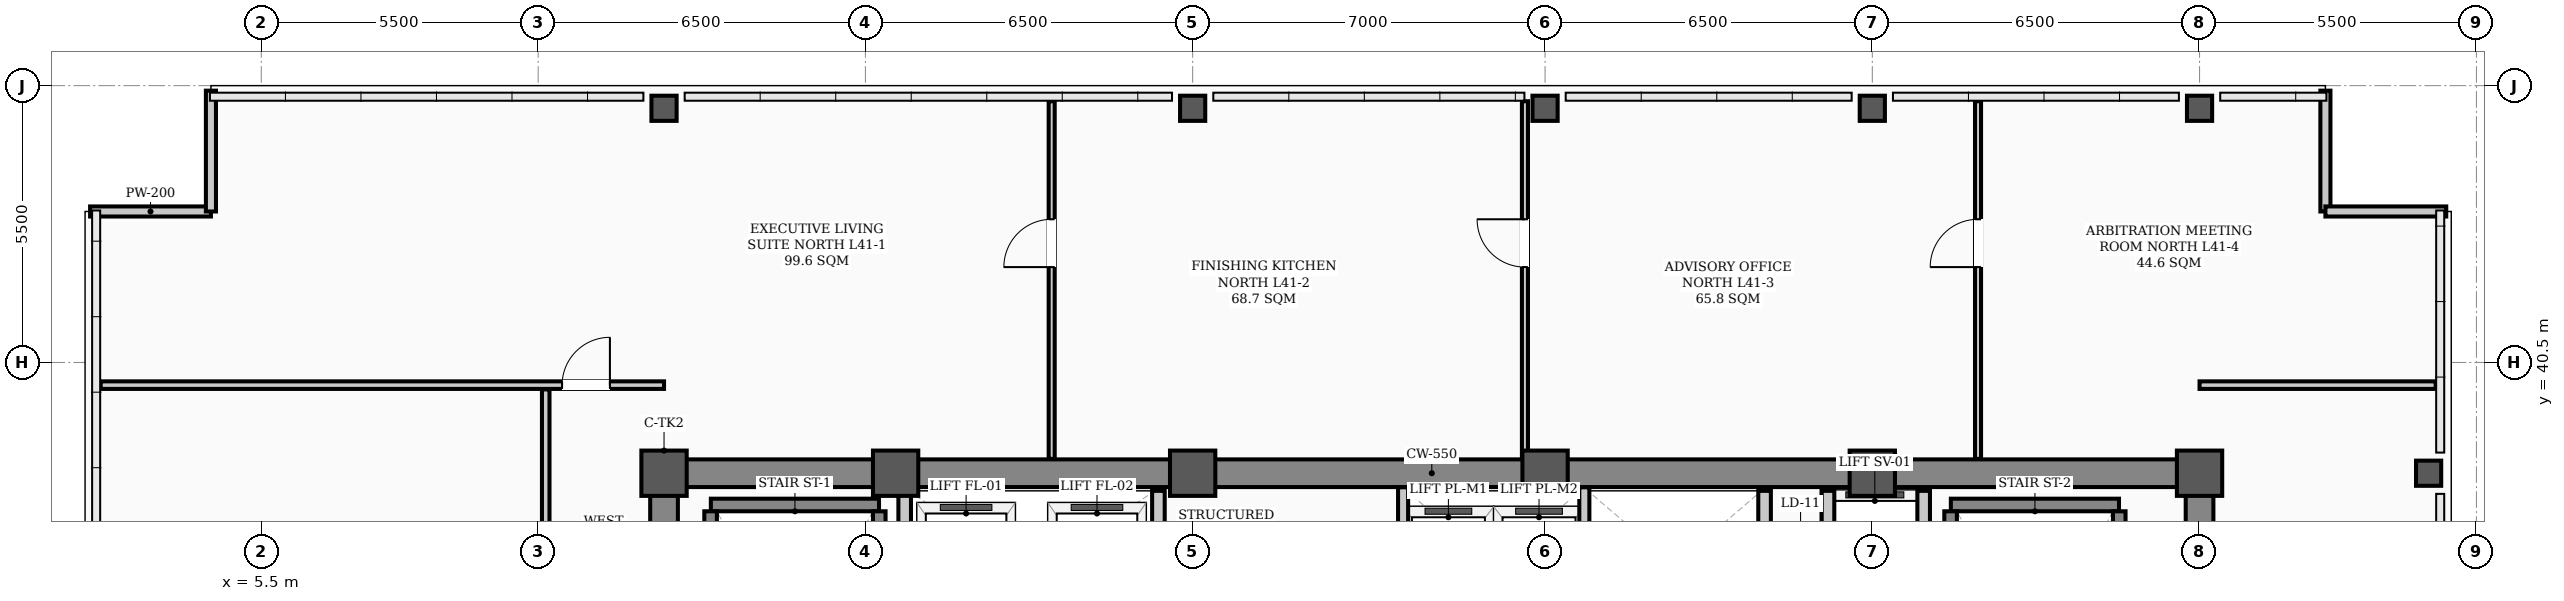
"""IFC4 building model, lengths in metres.
Left out: names, types, materials, properties, quantities, classifications, styles, units other than length and angle.
Written with IfcOpenShell. Run it as: python <this file> out.ifc"""

import sys

from ifc_helpers import new_model, si_unit, direction, frame, frame_2d, origin, origin_2d, place, context, subcontext, project, spatial, rectangle, hollow_rectangle, extrude, element, fill, save


model = new_model("IFC4")
c1 = context("Model", 3, precision=1e-05, world=origin(), true_north=direction((0.0, 1.0)))
c2 = subcontext(c1, "Body", "Model", "MODEL_VIEW")
j1 = project(units=[si_unit("LENGTHUNIT", "METRE"), si_unit("PLANEANGLEUNIT", "RADIAN")], contexts=[c1])
p1 = place(None, origin())
s1 = spatial("IfcSite", under=j1, at=p1, CompositionType="ELEMENT")
p2 = place(p1, origin())
s2 = spatial("IfcBuilding", under=s1, at=p2, CompositionType="ELEMENT")
p3 = place(p2, frame((0.0, 0.0, 165.6)))
s3 = spatial("IfcBuildingStorey", under=s2, at=p3, CompositionType="ELEMENT", Elevation=165.6)
for number, where, z_axis, x_axis in (
    (1, (13.5, 38.3, 0.0), (0.0, 0.0, 1.0), (1.0, 0.0, 0.0)),
    (2, (18.1, 38.3, 0.0), (0.0, 0.0, 1.0), (1.0, 0.0, 0.0)),
    (3, (24.0, 38.3, 0.0), (0.0, 0.0, 1.0), (1.0, 0.0, 0.0)),
    (4, (31.0, 38.3, 0.0), (0.0, 0.0, 1.0), (1.0, 0.0, 0.0)),
    (5, (37.5, 38.3, 0.0), (0.0, 0.0, 1.0), (1.0, 0.0, 0.0)),
    (6, (44.0, 38.3, 0.0), (0.0, 0.0, 1.0), (1.0, 0.0, 0.0)),
):
    element("IfcColumn", number, at=place(p3, frame(where, z_axis=z_axis, x_axis=x_axis)), inside=s3, PredefinedType="COLUMN", context=c2, shape_type="SweptSolid", body=[
        extrude(hollow_rectangle(XDim=0.9, YDim=0.9, WallThickness=0.035, InnerFilletRadius=0.017, OuterFilletRadius=0.052, at=origin_2d()), origin(), (0.0, 0.0, 1.0), 3.9),
    ])
for number, where, z_axis, x_axis in (
    (7, (13.5, 45.55, 0.0), (0.0, 0.0, 1.0), (1.0, 0.0, 0.0)),
    (8, (24.0, 45.55, 0.0), (0.0, 0.0, 1.0), (1.0, 0.0, 0.0)),
    (9, (31.0, 45.55, 0.0), (0.0, 0.0, 1.0), (1.0, 0.0, 0.0)),
    (10, (37.5, 45.55, 0.0), (0.0, 0.0, 1.0), (1.0, 0.0, 0.0)),
    (11, (44.0, 45.55, 0.0), (0.0, 0.0, 1.0), (1.0, 0.0, 0.0)),
):
    element("IfcColumn", number, at=place(p3, frame(where, z_axis=z_axis, x_axis=x_axis)), inside=s3, PredefinedType="COLUMN", context=c2, shape_type="SweptSolid", body=[
        extrude(hollow_rectangle(XDim=0.5, YDim=0.5, WallThickness=0.024, InnerFilletRadius=0.012, OuterFilletRadius=0.036, at=origin_2d()), origin(), (0.0, 0.0, 1.0), 3.66),
    ])
p4 = place(p3, frame((48.55, 38.3, 0.0), z_axis=(0.0, 0.0, 1.0), x_axis=(1.0, 0.0, 0.0)))
e12 = element("IfcColumn", 12, at=p4, inside=s3, PredefinedType="COLUMN", context=c2, shape_type="SweptSolid", body=[
    extrude(hollow_rectangle(XDim=0.5, YDim=0.5, WallThickness=0.024, InnerFilletRadius=0.012, OuterFilletRadius=0.036, at=origin_2d()), origin(), (0.0, 0.0, 1.0), 3.9),
])
for number, where, z_axis, x_axis in (
    (13, (2.1, 43.5, 0.0), (0.0, 0.0, 1.0), (1.0, 0.0, 0.0)),
    (14, (4.5, 43.5, 0.0), (0.0, 0.0, 1.0), (0.0, 1.0, 0.0)),
    (15, (46.5, 45.9, 0.0), (0.0, 0.0, 1.0), (0.0, -1.0, 0.0)),
    (16, (46.5, 43.5, 0.0), (0.0, 0.0, 1.0), (1.0, 0.0, 0.0)),
):
    element("IfcWall", number, at=place(p3, frame(where, z_axis=z_axis, x_axis=x_axis)), inside=s3, PredefinedType="PARAPET", context=c2, shape_type="SweptSolid", body=[
        extrude(rectangle(XDim=2.4, YDim=0.2, at=frame_2d((1.2, 0.0))), origin(), (0.0, 0.0, 1.0), 1.2),
    ])
p5 = place(p3, frame((13.5, 38.3, 0.0), z_axis=(0.0, 0.0, 1.0), x_axis=(1.0, 0.0, 0.0)))
e17 = element("IfcWall", 17, at=p5, inside=s3, PredefinedType="SHEAR", context=c2, shape_type="SweptSolid", body=[
    extrude(rectangle(XDim=30.5, YDim=0.55, at=frame_2d((15.25, 0.0))), origin(), (0.0, 0.0, 1.0), 3.66),
])
for number, where, z_axis, x_axis in (
    (18, (13.5, 29.35, 0.0), (0.0, 0.0, 1.0), (0.0, 1.0, 0.0)),
    (19, (44.0, 29.35, 0.0), (0.0, 0.0, 1.0), (0.0, 1.0, 0.0)),
):
    element("IfcWall", number, at=place(p3, frame(where, z_axis=z_axis, x_axis=x_axis)), inside=s3, PredefinedType="SHEAR", context=c2, shape_type="SweptSolid", body=[
        extrude(rectangle(XDim=8.6, YDim=0.55, at=frame_2d((4.3, 0.0))), origin(), (0.0, 0.0, 1.0), 3.66),
    ])
p6 = place(p3, frame((14.43, 37.669, 0.0), z_axis=(0.0, 0.0, 1.0), x_axis=(1.0, 0.0, 0.0)))
e20 = element("IfcWall", 20, at=p6, inside=s3, PredefinedType="STANDARD", context=c2, shape_type="SweptSolid", body=[
    extrude(rectangle(XDim=3.34, YDim=0.25, at=frame_2d((1.67, 0.0))), origin(), (0.0, 0.0, 1.0), 3.66),
])
for number, where, z_axis, x_axis in (
    (21, (14.425, 30.36, 0.0), (0.0, 0.0, 1.0), (0.0, 1.0, 0.0)),
    (22, (17.775, 30.36, 0.0), (0.0, 0.0, 1.0), (0.0, 1.0, 0.0)),
):
    element("IfcWall", number, at=place(p3, frame(where, z_axis=z_axis, x_axis=x_axis)), inside=s3, PredefinedType="STANDARD", context=c2, shape_type="SweptSolid", body=[
        extrude(rectangle(XDim=7.184, YDim=0.25, at=frame_2d((3.592, 0.0))), origin(), (0.0, 0.0, 1.0), 3.66),
    ])
p7 = place(p3, frame((39.06, 37.669, 0.0), z_axis=(0.0, 0.0, 1.0), x_axis=(1.0, 0.0, 0.0)))
e23 = element("IfcWall", 23, at=p7, inside=s3, PredefinedType="STANDARD", context=c2, shape_type="SweptSolid", body=[
    extrude(rectangle(XDim=3.34, YDim=0.25, at=frame_2d((1.67, 0.0))), origin(), (0.0, 0.0, 1.0), 3.66),
])
for number, where, z_axis, x_axis in (
    (24, (39.055, 30.36, 0.0), (0.0, 0.0, 1.0), (0.0, 1.0, 0.0)),
    (25, (42.405, 30.36, 0.0), (0.0, 0.0, 1.0), (0.0, 1.0, 0.0)),
):
    element("IfcWall", number, at=place(p3, frame(where, z_axis=z_axis, x_axis=x_axis)), inside=s3, PredefinedType="STANDARD", context=c2, shape_type="SweptSolid", body=[
        extrude(rectangle(XDim=7.184, YDim=0.25, at=frame_2d((3.592, 0.0))), origin(), (0.0, 0.0, 1.0), 3.66),
    ])
p8 = place(p3, frame((36.62, 31.95, 0.0), z_axis=(0.0, 0.0, 1.0), x_axis=(0.0, 1.0, 0.0)))
e26 = element("IfcWall", 26, at=p8, inside=s3, PredefinedType="STANDARD", context=c2, shape_type="SweptSolid", body=[
    extrude(rectangle(XDim=6.0, YDim=0.25, at=frame_2d((3.0, 0.0))), origin(), (0.0, 0.0, 1.0), 2.24),
])
p9 = place(p8, frame((0.9, 0.0, 0.0)))
e27 = element("IfcOpeningElement", 27, at=p9, cuts=e26, PredefinedType="OPENING", context=c2, shape_type="SweptSolid", body=[
    extrude(rectangle(XDim=1.1, YDim=2.08, at=frame_2d((0.55, 1.04))), frame((0.0, 0.135, 0.0), z_axis=(0.0, -1.0, 0.0), x_axis=(1.0, 0.0, 0.0)), (0.0, 0.0, 1.0), 0.27),
])
p10 = place(p8, frame((4.0, 0.0, 0.0)))
e28 = element("IfcOpeningElement", 28, at=p10, cuts=e26, PredefinedType="OPENING", context=c2, shape_type="SweptSolid", body=[
    extrude(rectangle(XDim=1.1, YDim=2.08, at=frame_2d((0.55, 1.04))), frame((0.0, 0.135, 0.0), z_axis=(0.0, -1.0, 0.0), x_axis=(1.0, 0.0, 0.0)), (0.0, 0.0, 1.0), 0.27),
])
p11 = place(p3, frame((38.52, 31.95, 0.0), z_axis=(0.0, 0.0, 1.0), x_axis=(0.0, 1.0, 0.0)))
e29 = element("IfcWall", 29, at=p11, inside=s3, PredefinedType="STANDARD", context=c2, shape_type="SweptSolid", body=[
    extrude(rectangle(XDim=6.0, YDim=0.25, at=frame_2d((3.0, 0.0))), origin(), (0.0, 0.0, 1.0), 2.24),
])
for number, where, z_axis, x_axis in (
    (30, (18.28, 34.62, 0.0), (0.0, 0.0, 1.0), (0.0, 1.0, 0.0)),
    (31, (23.32, 34.62, 0.0), (0.0, 0.0, 1.0), (0.0, 1.0, 0.0)),
):
    element("IfcWall", number, at=place(p3, frame(where, z_axis=z_axis, x_axis=x_axis)), inside=s3, PredefinedType="STANDARD", context=c2, shape_type="SweptSolid", body=[
        extrude(rectangle(XDim=3.33, YDim=0.25, at=frame_2d((1.665, 0.0))), origin(), (0.0, 0.0, 1.0), 2.24),
    ])
p12 = place(p3, frame((35.36, 34.9, 0.0), z_axis=(0.0, 0.0, 1.0), x_axis=(0.0, 1.0, 0.0)))
e32 = element("IfcWall", 32, at=p12, inside=s3, PredefinedType="STANDARD", context=c2, shape_type="SweptSolid", body=[
    extrude(rectangle(XDim=3.05, YDim=0.25, at=frame_2d((1.525, 0.0))), origin(), (0.0, 0.0, 1.0), 2.24),
])
p13 = place(p3, frame((2.31, 40.05, 0.0), z_axis=(0.0, 0.0, 1.0), x_axis=(1.0, 0.0, 0.0)))
e33 = element("IfcWall", 33, at=p13, inside=s3, PredefinedType="PARTITIONING", context=c2, shape_type="SweptSolid", body=[
    extrude(rectangle(XDim=11.19, YDim=0.15, at=frame_2d((5.595, 0.0))), origin(), (0.0, 0.0, 1.0), 2.24),
])
p14 = place(p13, frame((9.165, 0.0, 0.0)))
e34 = element("IfcOpeningElement", 34, at=p14, cuts=e33, PredefinedType="OPENING", context=c2, shape_type="SweptSolid", body=[
    extrude(rectangle(XDim=0.95, YDim=2.08, at=frame_2d((0.475, 1.04))), frame((0.0, 0.085, 0.0), z_axis=(0.0, -1.0, 0.0), x_axis=(1.0, 0.0, 0.0)), (0.0, 0.0, 1.0), 0.17),
])
p15 = place(p3, frame((44.0, 40.05, 0.0), z_axis=(0.0, 0.0, 1.0), x_axis=(1.0, 0.0, 0.0)))
e35 = element("IfcWall", 35, at=p15, inside=s3, PredefinedType="PARTITIONING", context=c2, shape_type="SweptSolid", body=[
    extrude(rectangle(XDim=4.69, YDim=0.15, at=frame_2d((2.345, 0.0))), origin(), (0.0, 0.0, 1.0), 2.24),
])
p16 = place(p3, frame((11.15, 26.385, 0.0), z_axis=(0.0, 0.0, 1.0), x_axis=(0.0, 1.0, 0.0)))
e36 = element("IfcWall", 36, at=p16, inside=s3, PredefinedType="PARTITIONING", context=c2, shape_type="SweptSolid", body=[
    extrude(rectangle(XDim=13.58, YDim=0.15, at=frame_2d((6.79, 0.0))), origin(), (0.0, 0.0, 1.0), 2.24),
])
p17 = place(p16, frame((6.315, 0.0, 0.0)))
e37 = element("IfcOpeningElement", 37, at=p17, cuts=e36, PredefinedType="OPENING", context=c2, shape_type="SweptSolid", body=[
    extrude(rectangle(XDim=0.95, YDim=2.08, at=frame_2d((0.475, 1.04))), frame((0.0, 0.085, 0.0), z_axis=(0.0, -1.0, 0.0), x_axis=(1.0, 0.0, 0.0)), (0.0, 0.0, 1.0), 0.17),
])
p18 = place(p3, frame((21.2, 38.585, 0.0), z_axis=(0.0, 0.0, 1.0), x_axis=(0.0, 1.0, 0.0)))
e38 = element("IfcWall", 38, at=p18, inside=s3, PredefinedType="PARTITIONING", context=c2, shape_type="SweptSolid", body=[
    extrude(rectangle(XDim=7.105, YDim=0.12, at=frame_2d((3.552, 0.0))), origin(), (0.0, 0.0, 1.0), 2.24),
])
p19 = place(p18, frame((3.81, 0.0, 0.0)))
e39 = element("IfcOpeningElement", 39, at=p19, cuts=e38, PredefinedType="OPENING", context=c2, shape_type="SweptSolid", body=[
    extrude(rectangle(XDim=0.95, YDim=2.08, at=frame_2d((0.475, 1.04))), frame((0.0, 0.07, 0.0), z_axis=(0.0, -1.0, 0.0), x_axis=(1.0, 0.0, 0.0)), (0.0, 0.0, 1.0), 0.14),
])
p20 = place(p3, frame((30.6, 38.585, 0.0), z_axis=(0.0, 0.0, 1.0), x_axis=(0.0, 1.0, 0.0)))
e40 = element("IfcWall", 40, at=p20, inside=s3, PredefinedType="PARTITIONING", context=c2, shape_type="SweptSolid", body=[
    extrude(rectangle(XDim=7.105, YDim=0.12, at=frame_2d((3.552, 0.0))), origin(), (0.0, 0.0, 1.0), 2.24),
])
p21 = place(p20, frame((3.81, 0.0, 0.0)))
e41 = element("IfcOpeningElement", 41, at=p21, cuts=e40, PredefinedType="OPENING", context=c2, shape_type="SweptSolid", body=[
    extrude(rectangle(XDim=0.95, YDim=2.08, at=frame_2d((0.475, 1.04))), frame((0.0, 0.07, 0.0), z_axis=(0.0, -1.0, 0.0), x_axis=(1.0, 0.0, 0.0)), (0.0, 0.0, 1.0), 0.14),
])
p22 = place(p3, frame((39.6, 38.585, 0.0), z_axis=(0.0, 0.0, 1.0), x_axis=(0.0, 1.0, 0.0)))
e42 = element("IfcWall", 42, at=p22, inside=s3, PredefinedType="PARTITIONING", context=c2, shape_type="SweptSolid", body=[
    extrude(rectangle(XDim=7.105, YDim=0.12, at=frame_2d((3.552, 0.0))), origin(), (0.0, 0.0, 1.0), 2.24),
])
p23 = place(p22, frame((3.81, 0.0, 0.0)))
e43 = element("IfcOpeningElement", 43, at=p23, cuts=e42, PredefinedType="OPENING", context=c2, shape_type="SweptSolid", body=[
    extrude(rectangle(XDim=0.95, YDim=2.08, at=frame_2d((0.475, 1.04))), frame((0.0, 0.07, 0.0), z_axis=(0.0, -1.0, 0.0), x_axis=(1.0, 0.0, 0.0)), (0.0, 0.0, 1.0), 0.14),
])
for number, where, z_axis, x_axis in (
    (44, (28.18, 34.9, 0.0), (0.0, 0.0, 1.0), (0.0, 1.0, 0.0)),
    (45, (31.78, 34.9, 0.0), (0.0, 0.0, 1.0), (0.0, 1.0, 0.0)),
):
    element("IfcWall", number, at=place(p3, frame(where, z_axis=z_axis, x_axis=x_axis)), inside=s3, PredefinedType="STANDARD", context=c2, shape_type="SweptSolid", body=[
        extrude(rectangle(XDim=3.12, YDim=0.2, at=frame_2d((1.56, 0.0))), origin(), (0.0, 0.0, 1.0), 2.24),
    ])
p24 = place(p14, origin())
e46 = element("IfcDoor", 46, at=p24, inside=s3, OperationType="SINGLE_SWING_RIGHT", PredefinedType="DOOR", context=c2, shape_type="SweptSolid", body=[
    extrude(rectangle(XDim=0.95, YDim=2.08, at=frame_2d((0.475, 1.04))), frame((0.0, 0.025, 0.0), z_axis=(0.0, -1.0, 0.0), x_axis=(1.0, 0.0, 0.0)), (0.0, 0.0, 1.0), 0.05),
])
fill(e34, e46)
p25 = place(p19, origin())
e47 = element("IfcDoor", 47, at=p25, inside=s3, OperationType="SINGLE_SWING_LEFT", PredefinedType="DOOR", context=c2, shape_type="SweptSolid", body=[
    extrude(rectangle(XDim=0.95, YDim=2.08, at=frame_2d((0.475, 1.04))), frame((0.0, 0.025, 0.0), z_axis=(0.0, -1.0, 0.0), x_axis=(1.0, 0.0, 0.0)), (0.0, 0.0, 1.0), 0.05),
])
fill(e39, e47)
p26 = place(p21, origin())
e48 = element("IfcDoor", 48, at=p26, inside=s3, OperationType="SINGLE_SWING_RIGHT", PredefinedType="DOOR", context=c2, shape_type="SweptSolid", body=[
    extrude(rectangle(XDim=0.95, YDim=2.08, at=frame_2d((0.475, 1.04))), frame((0.0, 0.025, 0.0), z_axis=(0.0, -1.0, 0.0), x_axis=(1.0, 0.0, 0.0)), (0.0, 0.0, 1.0), 0.05),
])
fill(e41, e48)
p27 = place(p23, origin())
e49 = element("IfcDoor", 49, at=p27, inside=s3, OperationType="SINGLE_SWING_LEFT", PredefinedType="DOOR", context=c2, shape_type="SweptSolid", body=[
    extrude(rectangle(XDim=0.95, YDim=2.08, at=frame_2d((0.475, 1.04))), frame((0.0, 0.025, 0.0), z_axis=(0.0, -1.0, 0.0), x_axis=(1.0, 0.0, 0.0)), (0.0, 0.0, 1.0), 0.05),
])
fill(e43, e49)
save(model, sys.argv[1])
